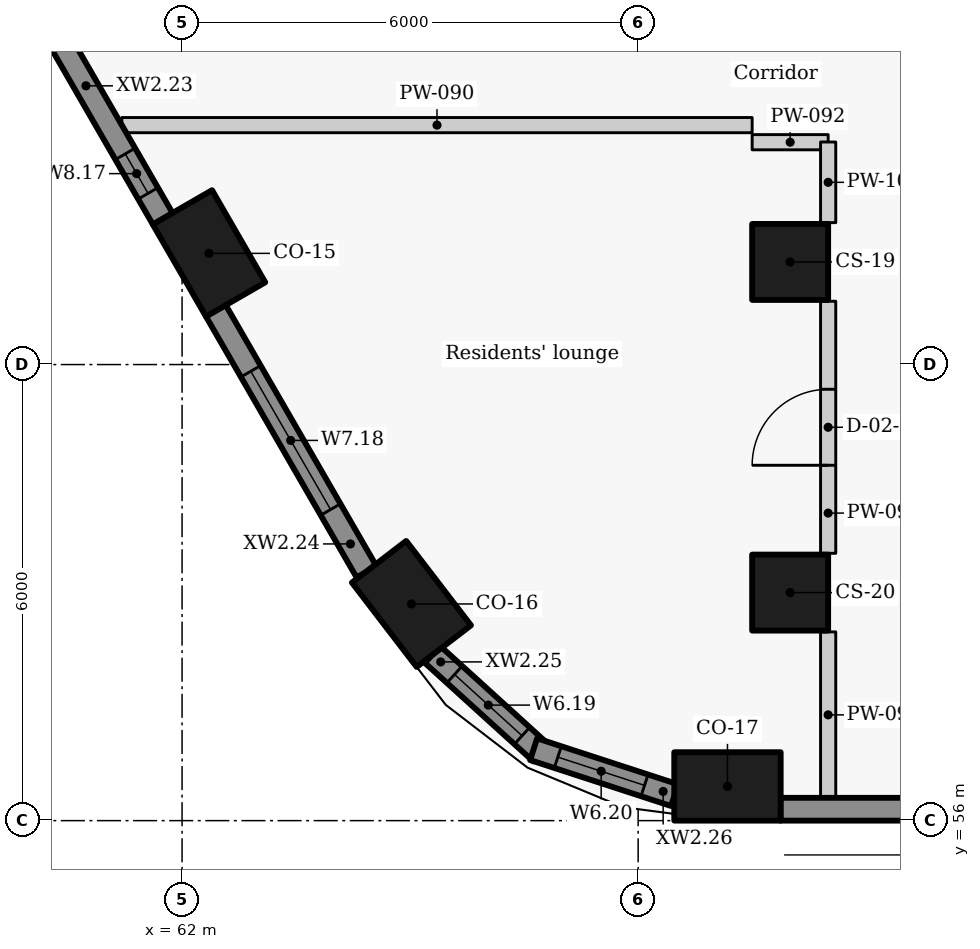
"""IFC4 building model, lengths in metres.
Left out: names, types, materials, properties, quantities, classifications, styles, units other than length and angle.
Written with IfcOpenShell. Run it as: python <this file> out.ifc"""

import sys

from ifc_helpers import new_model, si_unit, direction, frame, frame_2d, origin, origin_2d, place, context, subcontext, project, spatial, rectangle, extrude, element, fill, save


model = new_model("IFC4")
c1 = context("Model", 3, precision=1e-05, world=origin(), true_north=direction((0.0, 1.0)))
c2 = subcontext(c1, "Body", "Model", "MODEL_VIEW")
j1 = project(units=[si_unit("LENGTHUNIT", "METRE"), si_unit("PLANEANGLEUNIT", "RADIAN")], contexts=[c1])
p1 = place(None, origin())
s1 = spatial("IfcSite", under=j1, at=p1, CompositionType="ELEMENT")
p2 = place(p1, origin())
s2 = spatial("IfcBuilding", under=s1, at=p2, CompositionType="ELEMENT")
p3 = place(p2, frame((0.0, 0.0, 114.0)))
s3 = spatial("IfcBuildingStorey", under=s2, at=p3, CompositionType="ELEMENT", Elevation=114.0)
for number, where, z_axis, x_axis in (
    (1, (62.354, 63.463, 0.0), (0.0, 0.0, 1.0), (0.5, -0.866, 0.0)),
    (2, (65.018, 58.851, 0.0), (0.0, 0.0, 1.0), (0.609, -0.793, 0.0)),
    (3, (69.175, 56.45, 0.0), (0.0, 0.0, 1.0), (1.0, 0.0, 0.0)),
):
    element("IfcColumn", number, at=place(p3, frame(where, z_axis=z_axis, x_axis=x_axis)), inside=s3, PredefinedType="COLUMN", context=c2, shape_type="SweptSolid", body=[
        extrude(rectangle(XDim=1.4, YDim=0.9, at=origin_2d()), origin(), (0.0, 0.0, 1.0), 3.3),
    ])
for number, where, z_axis, x_axis in (
    (4, (70.0, 63.35, 0.0), (0.0, 0.0, 1.0), (0.0, -1.0, 0.0)),
    (5, (70.0, 59.0, 0.0), (0.0, 0.0, 1.0), (0.0, -1.0, 0.0)),
):
    element("IfcColumn", number, at=place(p3, frame(where, z_axis=z_axis, x_axis=x_axis)), inside=s3, PredefinedType="COLUMN", context=c2, shape_type="SweptSolid", body=[
        extrude(rectangle(XDim=1.0, YDim=1.0, at=origin_2d()), origin(), (0.0, 0.0, 1.0), 3.3),
    ])
p4 = place(p3, frame((59.78, 67.323, 0.0), z_axis=(0.0, 0.0, 1.0), x_axis=(0.499957037901, -0.866050206543, 0.0)))
e6 = element("IfcWall", 6, at=p4, inside=s3, PredefinedType="SOLIDWALL", context=c2, shape_type="SweptSolid", body=[
    extrude(rectangle(XDim=3.934, YDim=0.3, at=frame_2d((1.967, 0.0))), origin(), (0.0, 0.0, 1.0), 2.425),
])
p5 = place(p4, frame((0.278, 0.0, 0.9)))
e7 = element("IfcOpeningElement", 7, at=p5, cuts=e6, PredefinedType="OPENING", context=c2, shape_type="SweptSolid", body=[
    extrude(rectangle(XDim=0.6, YDim=1.1, at=frame_2d((0.3, 0.55))), frame((0.0, 0.16, 0.0), z_axis=(0.0, -1.0, 0.0), x_axis=(1.0, 0.0, 0.0)), (0.0, 0.0, 1.0), 0.32),
])
p6 = place(p4, frame((2.945, 0.0, 0.9)))
e8 = element("IfcOpeningElement", 8, at=p6, cuts=e6, PredefinedType="OPENING", context=c2, shape_type="SweptSolid", body=[
    extrude(rectangle(XDim=0.6, YDim=1.1, at=frame_2d((0.3, 0.55))), frame((0.0, 0.16, 0.0), z_axis=(0.0, -1.0, 0.0), x_axis=(1.0, 0.0, 0.0)), (0.0, 0.0, 1.0), 0.32),
])
p7 = place(p3, frame((62.443, 62.71, 0.0), z_axis=(0.0, 0.0, 1.0), x_axis=(0.500043828347, -0.866000097998, 0.0)))
e9 = element("IfcWall", 9, at=p7, inside=s3, PredefinedType="SOLIDWALL", context=c2, shape_type="SweptSolid", body=[
    extrude(rectangle(XDim=3.968, YDim=0.3, at=frame_2d((1.984, 0.0))), origin(), (0.0, 0.0, 1.0), 2.425),
])
p8 = place(p7, frame((0.922, 0.0, 0.9)))
e10 = element("IfcOpeningElement", 10, at=p8, cuts=e9, PredefinedType="OPENING", context=c2, shape_type="SweptSolid", body=[
    extrude(rectangle(XDim=2.1, YDim=1.1, at=frame_2d((1.05, 0.55))), frame((0.0, 0.16, 0.0), z_axis=(0.0, -1.0, 0.0), x_axis=(1.0, 0.0, 0.0)), (0.0, 0.0, 1.0), 0.32),
])
p9 = place(p3, frame((65.295, 58.186, 0.0), z_axis=(0.0, 0.0, 1.0), x_axis=(0.740421367382, -0.672142989791, 0.0)))
e11 = element("IfcWall", 11, at=p9, inside=s3, PredefinedType="SOLIDWALL", context=c2, shape_type="SweptSolid", body=[
    extrude(rectangle(XDim=1.927, YDim=0.3, at=frame_2d((0.964, 0.0))), origin(), (0.0, 0.0, 1.0), 2.425),
])
p10 = place(p9, frame((0.391, 0.0, 0.9)))
e12 = element("IfcOpeningElement", 12, at=p10, cuts=e11, PredefinedType="OPENING", context=c2, shape_type="SweptSolid", body=[
    extrude(rectangle(XDim=1.2, YDim=1.1, at=frame_2d((0.6, 0.55))), frame((0.0, 0.16, 0.0), z_axis=(0.0, -1.0, 0.0), x_axis=(1.0, 0.0, 0.0)), (0.0, 0.0, 1.0), 0.32),
])
p11 = place(p3, frame((66.625, 56.939, 0.0), z_axis=(0.0, 0.0, 1.0), x_axis=(0.950777961763, -0.309872985958, 0.0)))
e13 = element("IfcWall", 13, at=p11, inside=s3, PredefinedType="SOLIDWALL", context=c2, shape_type="SweptSolid", body=[
    extrude(rectangle(XDim=1.95, YDim=0.3, at=frame_2d((0.975, 0.0))), origin(), (0.0, 0.0, 1.0), 2.425),
])
p12 = place(p11, frame((0.335, 0.0, 0.9)))
e14 = element("IfcOpeningElement", 14, at=p12, cuts=e13, PredefinedType="OPENING", context=c2, shape_type="SweptSolid", body=[
    extrude(rectangle(XDim=1.2, YDim=1.1, at=frame_2d((0.6, 0.55))), frame((0.0, 0.16, 0.0), z_axis=(0.0, -1.0, 0.0), x_axis=(1.0, 0.0, 0.0)), (0.0, 0.0, 1.0), 0.32),
])
p13 = place(p3, frame((69.871, 56.15, 0.0), z_axis=(0.0, 0.0, 1.0), x_axis=(1.0, 0.0, 0.0)))
e15 = element("IfcWall", 15, at=p13, inside=s3, PredefinedType="SOLIDWALL", context=c2, shape_type="SweptSolid", body=[
    extrude(rectangle(XDim=19.94, YDim=0.3, at=frame_2d((9.97, 0.0))), origin(), (0.0, 0.0, 1.0), 2.425),
])
p14 = place(p3, frame((61.207, 65.15, 0.0), z_axis=(0.0, 0.0, 1.0), x_axis=(1.0, 0.0, 0.0)))
e16 = element("IfcWall", 16, at=p14, inside=s3, PredefinedType="PARTITIONING", context=c2, shape_type="SweptSolid", body=[
    extrude(rectangle(XDim=8.293, YDim=0.2, at=frame_2d((4.146, 0.0))), origin(), (0.0, 0.0, 1.0), 2.405),
])
p15 = place(p3, frame((69.5, 64.925, 0.0), z_axis=(0.0, 0.0, 1.0), x_axis=(1.0, 0.0, 0.0)))
e17 = element("IfcWall", 17, at=p15, inside=s3, PredefinedType="PARTITIONING", context=c2, shape_type="SweptSolid", body=[
    extrude(rectangle(XDim=1.0, YDim=0.2, at=frame_2d((0.5, 0.0))), origin(), (0.0, 0.0, 1.0), 2.505),
])
p16 = place(p3, frame((70.5, 56.3, 0.0), z_axis=(0.0, 0.0, 1.0), x_axis=(0.0, 1.0, 0.0)))
e18 = element("IfcWall", 18, at=p16, inside=s3, PredefinedType="PARTITIONING", context=c2, shape_type="SweptSolid", body=[
    extrude(rectangle(XDim=2.183, YDim=0.2, at=frame_2d((1.091, 0.0))), origin(), (0.0, 0.0, 1.0), 3.025),
])
p17 = place(p3, frame((70.5, 59.517, 0.0), z_axis=(0.0, 0.0, 1.0), x_axis=(0.0, 1.0, 0.0)))
e19 = element("IfcWall", 19, at=p17, inside=s3, PredefinedType="PARTITIONING", context=c2, shape_type="SweptSolid", body=[
    extrude(rectangle(XDim=3.316, YDim=0.2, at=frame_2d((1.658, 0.0))), origin(), (0.0, 0.0, 1.0), 3.025),
])
p18 = place(p17, frame((1.158, 0.0, 0.0)))
e20 = element("IfcOpeningElement", 20, at=p18, cuts=e19, PredefinedType="OPENING", context=c2, shape_type="SweptSolid", body=[
    extrude(rectangle(XDim=1.0, YDim=2.1, at=frame_2d((0.5, 1.05))), frame((0.0, 0.11, 0.0), z_axis=(0.0, -1.0, 0.0), x_axis=(1.0, 0.0, 0.0)), (0.0, 0.0, 1.0), 0.22),
])
p19 = place(p3, frame((70.5, 63.867, 0.0), z_axis=(0.0, 0.0, 1.0), x_axis=(0.0, 1.0, 0.0)))
e21 = element("IfcWall", 21, at=p19, inside=s3, PredefinedType="PARTITIONING", context=c2, shape_type="SweptSolid", body=[
    extrude(rectangle(XDim=1.061, YDim=0.2, at=frame_2d((0.531, 0.0))), origin(), (0.0, 0.0, 1.0), 3.025),
])
p20 = place(p6, origin())
e22 = element("IfcWindow", 22, at=p20, inside=s3, PartitioningType="SINGLE_PANEL", PredefinedType="WINDOW", context=c2, shape_type="SweptSolid", body=[
    extrude(rectangle(XDim=0.6, YDim=1.1, at=frame_2d((0.3, 0.55))), frame((0.0, 0.03, 0.0), z_axis=(0.0, -1.0, 0.0), x_axis=(1.0, 0.0, 0.0)), (0.0, 0.0, 1.0), 0.06),
])
fill(e8, e22)
p21 = place(p8, origin())
e23 = element("IfcWindow", 23, at=p21, inside=s3, PartitioningType="SINGLE_PANEL", PredefinedType="WINDOW", context=c2, shape_type="SweptSolid", body=[
    extrude(rectangle(XDim=2.1, YDim=1.1, at=frame_2d((1.05, 0.55))), frame((0.0, 0.03, 0.0), z_axis=(0.0, -1.0, 0.0), x_axis=(1.0, 0.0, 0.0)), (0.0, 0.0, 1.0), 0.06),
])
fill(e10, e23)
p22 = place(p10, origin())
e24 = element("IfcWindow", 24, at=p22, inside=s3, PartitioningType="SINGLE_PANEL", PredefinedType="WINDOW", context=c2, shape_type="SweptSolid", body=[
    extrude(rectangle(XDim=1.2, YDim=1.1, at=frame_2d((0.6, 0.55))), frame((0.0, 0.03, 0.0), z_axis=(0.0, -1.0, 0.0), x_axis=(1.0, 0.0, 0.0)), (0.0, 0.0, 1.0), 0.06),
])
fill(e12, e24)
p23 = place(p12, origin())
e25 = element("IfcWindow", 25, at=p23, inside=s3, PartitioningType="SINGLE_PANEL", PredefinedType="WINDOW", context=c2, shape_type="SweptSolid", body=[
    extrude(rectangle(XDim=1.2, YDim=1.1, at=frame_2d((0.6, 0.55))), frame((0.0, 0.03, 0.0), z_axis=(0.0, -1.0, 0.0), x_axis=(1.0, 0.0, 0.0)), (0.0, 0.0, 1.0), 0.06),
])
fill(e14, e25)
p24 = place(p18, origin())
e26 = element("IfcDoor", 26, at=p24, inside=s3, OperationType="SINGLE_SWING_LEFT", PredefinedType="DOOR", context=c2, shape_type="SweptSolid", body=[
    extrude(rectangle(XDim=1.0, YDim=2.1, at=frame_2d((0.5, 1.05))), frame((0.0, 0.025, 0.0), z_axis=(0.0, -1.0, 0.0), x_axis=(1.0, 0.0, 0.0)), (0.0, 0.0, 1.0), 0.05),
])
fill(e20, e26)
save(model, sys.argv[1])
